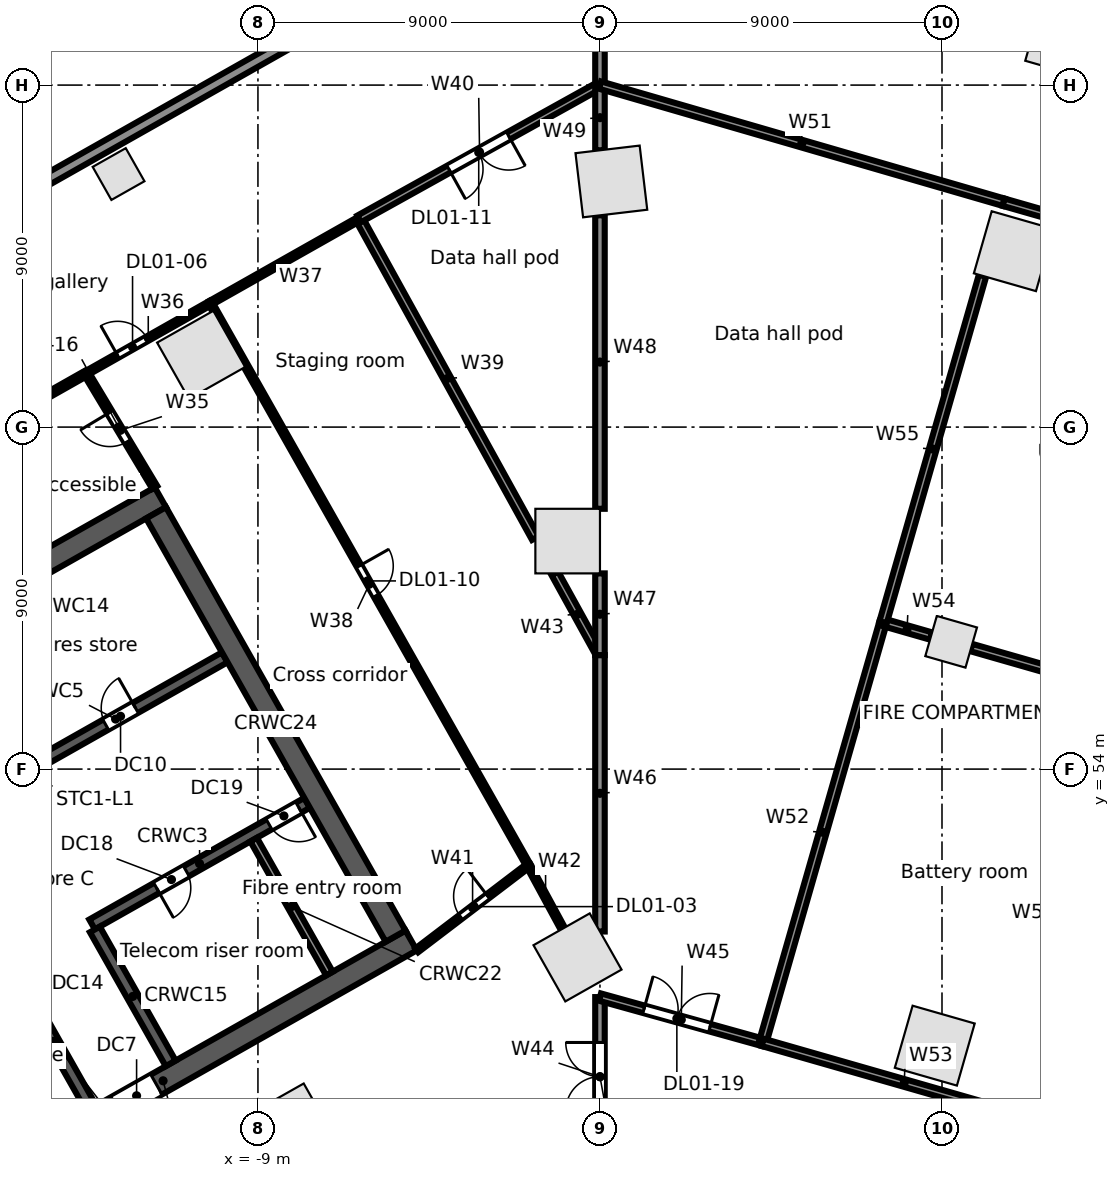
"""IFC4 building model, lengths in metres.
Left out: names, types, materials, properties, quantities, classifications, styles, units other than length and angle.
Written with IfcOpenShell. Run it as: python <this file> out.ifc"""

import sys

from ifc_helpers import new_model, si_unit, direction, frame, frame_2d, origin, origin_2d, place, context, subcontext, project, spatial, rectangle, extrude, element, fill, save


model = new_model("IFC4")
c1 = context("Model", 3, precision=1e-05, world=origin(), true_north=direction((0.0, 1.0)))
c2 = subcontext(c1, "Body", "Model", "MODEL_VIEW")
j1 = project(units=[si_unit("LENGTHUNIT", "METRE"), si_unit("PLANEANGLEUNIT", "RADIAN")], contexts=[c1])
p1 = place(None, origin())
s1 = spatial("IfcSite", under=j1, at=p1, CompositionType="ELEMENT")
p2 = place(p1, origin())
s2 = spatial("IfcBuilding", under=s1, at=p2, CompositionType="ELEMENT")
p3 = place(p2, frame((0.0, 0.0, 6.5)))
s3 = spatial("IfcBuildingStorey", under=s2, at=p3, CompositionType="ELEMENT", Elevation=6.5)
for number, where, z_axis, x_axis in (
    (1, (10.89, 67.629, 0.0), (0.0, 0.0, 1.0), (-0.961, 0.276, 0.0)),
    (2, (0.3, 69.464, 0.0), (0.0, 0.0, 1.0), (-0.993, -0.118, 0.0)),
    (3, (-10.495, 64.902, 0.0), (0.0, 0.0, 1.0), (-0.87, -0.492, 0.0)),
    (4, (-8.117, 44.568, 0.0), (0.0, 0.0, 1.0), (0.87, 0.492, 0.0)),
    (5, (-0.591, 49.044, 0.0), (0.0, 0.0, 1.0), (0.87, 0.492, 0.0)),
    (6, (8.81, 46.722, 0.0), (0.0, 0.0, 1.0), (0.961, -0.276, 0.0)),
    (7, (-0.85, 60.0, 0.0), (0.0, 0.0, 1.0), (0.0, 1.0, 0.0)),
):
    element("IfcColumn", number, at=place(p3, frame(where, z_axis=z_axis, x_axis=x_axis)), inside=s3, PredefinedType="COLUMN", context=c2, shape_type="SweptSolid", body=[
        extrude(rectangle(XDim=1.7, YDim=1.7, at=origin_2d()), origin(), (0.0, 0.0, 1.0), 5.0),
    ])
for number, where, z_axis, x_axis in (
    (8, (11.809, 72.983, 0.0), (0.0, 0.0, 1.0), (-0.961, 0.276, 0.0)),
    (9, (-12.667, 69.659, 0.0), (0.0, 0.0, 1.0), (-0.87, -0.492, 0.0)),
):
    element("IfcColumn", number, at=place(p3, frame(where, z_axis=z_axis, x_axis=x_axis)), inside=s3, PredefinedType="COLUMN", context=c2, shape_type="SweptSolid", body=[
        extrude(rectangle(XDim=1.0, YDim=1.0, at=origin_2d()), origin(), (0.0, 0.0, 1.0), 5.0),
    ])
p4 = place(p3, frame((9.241, 57.35, 0.0), z_axis=(0.0, 0.0, 1.0), x_axis=(0.961261695938, -0.275637355817, 0.0)))
e10 = element("IfcColumn", 10, at=p4, inside=s3, PredefinedType="COLUMN", context=c2, shape_type="SweptSolid", body=[
    extrude(rectangle(XDim=1.1, YDim=1.1, at=origin_2d()), origin(), (0.0, 0.0, 1.0), 5.0),
])
p5 = place(p3, frame((-63.707, 41.701, 0.0), z_axis=(0.0, 0.0, 1.0), x_axis=(0.870355510268, 0.492423888277, 0.0)))
e11 = element("IfcWall", 11, at=p5, inside=s3, PredefinedType="STANDARD", context=c2, shape_type="SweptSolid", body=[
    extrude(rectangle(XDim=67.903, YDim=0.3, at=frame_2d((33.952, 0.0))), origin(), (0.0, 0.0, 1.0), 4.65),
])
p6 = place(p3, frame((-18.024, 42.104, 0.0), z_axis=(0.0, 0.0, 1.0), x_axis=(0.870360574057, 0.492414937962, 0.0)))
e12 = element("IfcWall", 12, at=p6, inside=s3, PredefinedType="SOLIDWALL", context=c2, shape_type="SweptSolid", body=[
    extrude(rectangle(XDim=15.0, YDim=0.6, at=frame_2d((7.5, 0.0))), origin(), (0.0, 0.0, 1.0), 4.65),
])
p7 = place(p6, frame((6.1, 0.0, 0.0)))
e13 = element("IfcOpeningElement", 13, at=p7, cuts=e12, PredefinedType="OPENING", context=c2, shape_type="SweptSolid", body=[
    extrude(rectangle(XDim=1.2, YDim=2.1, at=frame_2d((0.6, 1.05))), frame((0.0, 0.31, 0.0), z_axis=(0.0, -1.0, 0.0), x_axis=(1.0, 0.0, 0.0)), (0.0, 0.0, 1.0), 0.62),
])
p8 = place(p3, frame((-13.365, 49.911, 0.0), z_axis=(0.0, 0.0, 1.0), x_axis=(0.870340995471, 0.49244954219, 0.0)))
e14 = element("IfcWall", 14, at=p8, inside=s3, PredefinedType="SOLIDWALL", context=c2, shape_type="SweptSolid", body=[
    extrude(rectangle(XDim=6.5, YDim=0.3, at=frame_2d((3.25, 0.0))), origin(), (0.0, 0.0, 1.0), 4.65),
])
p9 = place(p8, frame((1.95, 0.0, 0.0)))
e15 = element("IfcOpeningElement", 15, at=p9, cuts=e14, PredefinedType="OPENING", context=c2, shape_type="SweptSolid", body=[
    extrude(rectangle(XDim=0.9, YDim=2.1, at=frame_2d((0.45, 1.05))), frame((0.0, 0.16, 0.0), z_axis=(0.0, -1.0, 0.0), x_axis=(1.0, 0.0, 0.0)), (0.0, 0.0, 1.0), 0.32),
])
p10 = place(p8, frame((5.35, 0.0, 0.0)))
e16 = element("IfcOpeningElement", 16, at=p10, cuts=e14, PredefinedType="OPENING", context=c2, shape_type="SweptSolid", body=[
    extrude(rectangle(XDim=0.9, YDim=2.1, at=frame_2d((0.45, 1.05))), frame((0.0, 0.16, 0.0), z_axis=(0.0, -1.0, 0.0), x_axis=(1.0, 0.0, 0.0)), (0.0, 0.0, 1.0), 0.32),
])
p11 = place(p3, frame((-15.618, 53.691, 0.0), z_axis=(0.0, 0.0, 1.0), x_axis=(0.870356769198, 0.492421663121, 0.0)))
e17 = element("IfcWall", 17, at=p11, inside=s3, PredefinedType="SOLIDWALL", context=c2, shape_type="SweptSolid", body=[
    extrude(rectangle(XDim=6.6, YDim=0.3, at=frame_2d((3.3, 0.0))), origin(), (0.0, 0.0, 1.0), 4.65),
])
p12 = place(p11, frame((3.0, 0.0, 0.0)))
e18 = element("IfcOpeningElement", 18, at=p12, cuts=e17, PredefinedType="OPENING", context=c2, shape_type="SweptSolid", body=[
    extrude(rectangle(XDim=0.9, YDim=2.1, at=frame_2d((0.45, 1.05))), frame((0.0, 0.16, 0.0), z_axis=(0.0, -1.0, 0.0), x_axis=(1.0, 0.0, 0.0)), (0.0, 0.0, 1.0), 0.32),
])
p13 = place(p3, frame((-24.623, 53.767, 0.0), z_axis=(0.0, 0.0, 1.0), x_axis=(0.870356627484, 0.492421913601, 0.0)))
e19 = element("IfcWall", 19, at=p13, inside=s3, PredefinedType="SOLIDWALL", context=c2, shape_type="SweptSolid", body=[
    extrude(rectangle(XDim=15.0, YDim=0.6, at=frame_2d((7.5, 0.0))), origin(), (0.0, 0.0, 1.0), 4.65),
])
for number, where, z_axis, x_axis in (
    (20, (-15.379, 48.599, 0.0), (0.0, 0.0, 1.0), (0.492, -0.87, 0.0)),
    (21, (-13.291, 49.781, 0.0), (0.0, 0.0, 1.0), (0.492, -0.87, 0.0)),
):
    element("IfcWall", number, at=place(p3, frame(where, z_axis=z_axis, x_axis=x_axis)), inside=s3, PredefinedType="SOLIDWALL", context=c2, shape_type="SweptSolid", body=[
        extrude(rectangle(XDim=4.05, YDim=0.3, at=frame_2d((2.025, 0.0))), origin(), (0.0, 0.0, 1.0), 4.65),
    ])
p14 = place(p3, frame((-9.113, 52.144, 0.0), z_axis=(0.0, 0.0, 1.0), x_axis=(0.492394910396, -0.870371904542, 0.0)))
e22 = element("IfcWall", 22, at=p14, inside=s3, PredefinedType="PARTITIONING", context=c2, shape_type="SweptSolid", body=[
    extrude(rectangle(XDim=4.05, YDim=0.2, at=frame_2d((2.025, 0.0))), origin(), (0.0, 0.0, 1.0), 4.65),
])
p15 = place(p3, frame((-11.681, 60.744, 0.0), z_axis=(0.0, 0.0, 1.0), x_axis=(0.492426772896, -0.870353878221, 0.0)))
e23 = element("IfcWall", 23, at=p15, inside=s3, PredefinedType="SOLIDWALL", context=c2, shape_type="SweptSolid", body=[
    extrude(rectangle(XDim=12.8, YDim=0.6, at=frame_2d((6.4, 0.0))), origin(), (0.0, 0.0, 1.0), 4.65),
])
p16 = place(p3, frame((-16.346, 62.816, 0.0), z_axis=(0.0, 0.0, 1.0), x_axis=(0.870334637055, 0.492460779699, 0.0)))
e24 = element("IfcWall", 24, at=p16, inside=s3, PredefinedType="PARTITIONING", context=c2, shape_type="SweptSolid", body=[
    extrude(rectangle(XDim=3.249, YDim=0.15, at=frame_2d((1.625, 0.0))), origin(), (0.0, 0.0, 1.0), 4.65),
])
p17 = place(p3, frame((-13.518, 64.416, 0.0), z_axis=(0.0, 0.0, 1.0), x_axis=(0.514875058642, -0.857265229663, 0.0)))
e25 = element("IfcWall", 25, at=p17, inside=s3, PredefinedType="PARTITIONING", context=c2, shape_type="SweptSolid", body=[
    extrude(rectangle(XDim=3.502, YDim=0.15, at=frame_2d((1.751, 0.0))), origin(), (0.0, 0.0, 1.0), 3.93),
])
p18 = place(p17, frame((1.2, 0.0, 0.0)))
e26 = element("IfcOpeningElement", 26, at=p18, cuts=e25, PredefinedType="OPENING", context=c2, shape_type="SweptSolid", body=[
    extrude(rectangle(XDim=0.9, YDim=2.1, at=frame_2d((0.45, 1.05))), frame((0.0, 0.085, 0.0), z_axis=(0.0, -1.0, 0.0), x_axis=(1.0, 0.0, 0.0)), (0.0, 0.0, 1.0), 0.17),
])
p19 = place(p3, frame((-13.518, 64.416, 0.0), z_axis=(0.0, 0.0, 1.0), x_axis=(0.870338454914, 0.492454032268, 0.0)))
e27 = element("IfcWall", 27, at=p19, inside=s3, PredefinedType="PARTITIONING", context=c2, shape_type="SweptSolid", body=[
    extrude(rectangle(XDim=3.75, YDim=0.125, at=frame_2d((1.875, 0.0))), origin(), (0.0, 0.0, 1.0), 3.712),
])
p20 = place(p19, frame((0.95, 0.0, 0.0)))
e28 = element("IfcOpeningElement", 28, at=p20, cuts=e27, PredefinedType="OPENING", context=c2, shape_type="SweptSolid", body=[
    extrude(rectangle(XDim=0.9, YDim=2.1, at=frame_2d((0.45, 1.05))), frame((0.0, 0.073, 0.0), z_axis=(0.0, -1.0, 0.0), x_axis=(1.0, 0.0, 0.0)), (0.0, 0.0, 1.0), 0.145),
])
p21 = place(p3, frame((-10.254, 66.263, 0.0), z_axis=(0.0, 0.0, 1.0), x_axis=(0.870454697906, 0.492248533664, 0.0)))
e29 = element("IfcWall", 29, at=p21, inside=s3, PredefinedType="PARTITIONING", context=c2, shape_type="SweptSolid", body=[
    extrude(rectangle(XDim=4.5, YDim=0.125, at=frame_2d((2.25, 0.0))), origin(), (0.0, 0.0, 1.0), 4.65),
])
p22 = place(p3, frame((-10.254, 66.263, 0.0), z_axis=(0.0, 0.0, 1.0), x_axis=(0.492411664329, -0.870362426138, 0.0)))
e30 = element("IfcWall", 30, at=p22, inside=s3, PredefinedType="PARTITIONING", context=c2, shape_type="SweptSolid", body=[
    extrude(rectangle(XDim=17.0, YDim=0.125, at=frame_2d((8.5, 0.0))), origin(), (0.0, 0.0, 1.0), 3.712),
])
p23 = place(p22, frame((7.95, 0.0, 0.0)))
e31 = element("IfcOpeningElement", 31, at=p23, cuts=e30, PredefinedType="OPENING", context=c2, shape_type="SweptSolid", body=[
    extrude(rectangle(XDim=0.9, YDim=2.1, at=frame_2d((0.45, 1.05))), frame((0.0, 0.073, 0.0), z_axis=(0.0, -1.0, 0.0), x_axis=(1.0, 0.0, 0.0)), (0.0, 0.0, 1.0), 0.145),
])
p24 = place(p3, frame((-6.337, 68.478, 0.0), z_axis=(0.0, 0.0, 1.0), x_axis=(0.483322867171, -0.875442177456, 0.0)))
e32 = element("IfcWall", 32, at=p24, inside=s3, PredefinedType="PARTITIONING", context=c2, shape_type="SweptSolid", body=[
    extrude(rectangle(XDim=9.594, YDim=0.2, at=frame_2d((4.797, 0.0))), origin(), (0.0, 0.0, 1.0), 3.712),
])
p25 = place(p3, frame((-6.337, 68.478, 0.0), z_axis=(0.0, 0.0, 1.0), x_axis=(0.87407148623, 0.485797320864, 0.0)))
e33 = element("IfcWall", 33, at=p25, inside=s3, PredefinedType="PARTITIONING", context=c2, shape_type="SweptSolid", body=[
    extrude(rectangle(XDim=7.25, YDim=0.2, at=frame_2d((3.625, 0.0))), origin(), (0.0, 0.0, 1.0), 3.93),
])
p26 = place(p25, frame((2.7, 0.0, 0.0)))
e34 = element("IfcOpeningElement", 34, at=p26, cuts=e33, PredefinedType="OPENING", context=c2, shape_type="SweptSolid", body=[
    extrude(rectangle(XDim=1.8, YDim=2.1, at=frame_2d((0.9, 1.05))), frame((0.0, 0.11, 0.0), z_axis=(0.0, -1.0, 0.0), x_axis=(1.0, 0.0, 0.0)), (0.0, 0.0, 1.0), 0.22),
])
p27 = place(p3, frame((-4.821, 49.23, 0.0), z_axis=(0.0, 0.0, 1.0), x_axis=(0.795615322848, 0.605802160816, 0.0)))
e35 = element("IfcWall", 35, at=p27, inside=s3, PredefinedType="PARTITIONING", context=c2, shape_type="SweptSolid", body=[
    extrude(rectangle(XDim=3.693, YDim=0.125, at=frame_2d((1.846, 0.0))), origin(), (0.0, 0.0, 1.0), 4.65),
])
p28 = place(p27, frame((1.45, 0.0, 0.0)))
e36 = element("IfcOpeningElement", 36, at=p28, cuts=e35, PredefinedType="OPENING", context=c2, shape_type="SweptSolid", body=[
    extrude(rectangle(XDim=0.9, YDim=2.1, at=frame_2d((0.45, 1.05))), frame((0.0, 0.073, 0.0), z_axis=(0.0, -1.0, 0.0), x_axis=(1.0, 0.0, 0.0)), (0.0, 0.0, 1.0), 0.145),
])
p29 = place(p3, frame((-1.883, 51.467, 0.0), z_axis=(0.0, 0.0, 1.0), x_axis=(0.477162952876, -0.878814836244, 0.0)))
e37 = element("IfcWall", 37, at=p29, inside=s3, PredefinedType="PARTITIONING", context=c2, shape_type="SweptSolid", body=[
    extrude(rectangle(XDim=1.895, YDim=0.125, at=frame_2d((0.947, 0.0))), origin(), (0.0, 0.0, 1.0), 4.65),
])
p30 = place(p3, frame((-1.187, 59.15, 0.0), z_axis=(0.0, 0.0, 1.0), x_axis=(0.483345381597, -0.875429747089, 0.0)))
e38 = element("IfcWall", 38, at=p30, inside=s3, PredefinedType="PARTITIONING", context=c2, shape_type="SweptSolid", body=[
    extrude(rectangle(XDim=2.456, YDim=0.2, at=frame_2d((1.228, 0.0))), origin(), (0.0, 0.0, 1.0), 4.65),
])
p31 = place(p3, frame((0.0, 43.806, 0.0), z_axis=(0.0, 0.0, 1.0), x_axis=(0.0, 1.0, 0.0)))
e39 = element("IfcWall", 39, at=p31, inside=s3, PredefinedType="PARTITIONING", context=c2, shape_type="SweptSolid", body=[
    extrude(rectangle(XDim=4.194, YDim=0.25, at=frame_2d((2.097, 0.0))), origin(), (0.0, 0.0, 1.0), 3.712),
])
p32 = place(p31, frame((1.2, 0.0, 0.0)))
e40 = element("IfcOpeningElement", 40, at=p32, cuts=e39, PredefinedType="OPENING", context=c2, shape_type="SweptSolid", body=[
    extrude(rectangle(XDim=1.8, YDim=2.1, at=frame_2d((0.9, 1.05))), frame((0.0, 0.135, 0.0), z_axis=(0.0, -1.0, 0.0), x_axis=(1.0, 0.0, 0.0)), (0.0, 0.0, 1.0), 0.27),
])
p33 = place(p3, frame((0.0, 48.0, 0.0), z_axis=(0.0, 0.0, 1.0), x_axis=(0.963400508162, -0.268066150181, 0.0)))
e41 = element("IfcWall", 41, at=p33, inside=s3, PredefinedType="PARTITIONING", context=c2, shape_type="SweptSolid", body=[
    extrude(rectangle(XDim=4.443, YDim=0.2, at=frame_2d((2.221, 0.0))), origin(), (0.0, 0.0, 1.0), 4.65),
])
p34 = place(p33, frame((1.2, 0.0, 0.0)))
e42 = element("IfcOpeningElement", 42, at=p34, cuts=e41, PredefinedType="OPENING", context=c2, shape_type="SweptSolid", body=[
    extrude(rectangle(XDim=1.8, YDim=2.1, at=frame_2d((0.9, 1.05))), frame((0.0, 0.11, 0.0), z_axis=(0.0, -1.0, 0.0), x_axis=(1.0, 0.0, 0.0)), (0.0, 0.0, 1.0), 0.22),
])
p35 = place(p3, frame((0.0, 49.726, 0.0), z_axis=(0.0, 0.0, 1.0), x_axis=(0.0, 1.0, 0.0)))
e43 = element("IfcWall", 43, at=p35, inside=s3, PredefinedType="PARTITIONING", context=c2, shape_type="SweptSolid", body=[
    extrude(rectangle(XDim=7.274, YDim=0.25, at=frame_2d((3.637, 0.0))), origin(), (0.0, 0.0, 1.0), 4.65),
])
p36 = place(p3, frame((0.0, 57.0, 0.0), z_axis=(0.0, 0.0, 1.0), x_axis=(0.0, 1.0, 0.0)))
e44 = element("IfcWall", 44, at=p36, inside=s3, PredefinedType="PARTITIONING", context=c2, shape_type="SweptSolid", body=[
    extrude(rectangle(XDim=2.15, YDim=0.25, at=frame_2d((1.075, 0.0))), origin(), (0.0, 0.0, 1.0), 4.65),
])
p37 = place(p3, frame((0.0, 60.85, 0.0), z_axis=(0.0, 0.0, 1.0), x_axis=(0.0, 1.0, 0.0)))
e45 = element("IfcWall", 45, at=p37, inside=s3, PredefinedType="PARTITIONING", context=c2, shape_type="SweptSolid", body=[
    extrude(rectangle(XDim=7.723, YDim=0.25, at=frame_2d((3.861, 0.0))), origin(), (0.0, 0.0, 1.0), 3.93),
])
p38 = place(p3, frame((0.0, 70.285, 0.0), z_axis=(0.0, 0.0, 1.0), x_axis=(0.0, 1.0, 0.0)))
e46 = element("IfcWall", 46, at=p38, inside=s3, PredefinedType="PARTITIONING", context=c2, shape_type="SweptSolid", body=[
    extrude(rectangle(XDim=1.715, YDim=0.25, at=frame_2d((0.857, 0.0))), origin(), (0.0, 0.0, 1.0), 4.65),
])
p39 = place(p3, frame((0.0, 72.0, 0.0), z_axis=(0.0, 0.0, 1.0), x_axis=(0.0, 1.0, 0.0)))
e47 = element("IfcWall", 47, at=p39, inside=s3, PredefinedType="PARTITIONING", context=c2, shape_type="SweptSolid", body=[
    extrude(rectangle(XDim=3.521, YDim=0.25, at=frame_2d((1.76, 0.0))), origin(), (0.0, 0.0, 1.0), 4.024),
])
p40 = place(p3, frame((0.0, 72.0, 0.0), z_axis=(0.0, 0.0, 1.0), x_axis=(0.960375968852, -0.278707729443, 0.0)))
e48 = element("IfcWall", 48, at=p40, inside=s3, PredefinedType="PARTITIONING", context=c2, shape_type="SweptSolid", body=[
    extrude(rectangle(XDim=11.058, YDim=0.2, at=frame_2d((5.529, 0.0))), origin(), (0.0, 0.0, 1.0), 3.712),
])
p41 = place(p3, frame((4.28, 46.809, 0.0), z_axis=(0.0, 0.0, 1.0), x_axis=(0.275635044812, 0.961262358605, 0.0)))
e49 = element("IfcWall", 49, at=p41, inside=s3, PredefinedType="PARTITIONING", context=c2, shape_type="SweptSolid", body=[
    extrude(rectangle(XDim=11.5, YDim=0.2, at=frame_2d((5.75, 0.0))), origin(), (0.0, 0.0, 1.0), 3.712),
])
p42 = place(p3, frame((4.28, 46.809, 0.0), z_axis=(0.0, 0.0, 1.0), x_axis=(0.961270337968, -0.275607215693, 0.0)))
e50 = element("IfcWall", 50, at=p42, inside=s3, PredefinedType="PARTITIONING", context=c2, shape_type="SweptSolid", body=[
    extrude(rectangle(XDim=7.75, YDim=0.2, at=frame_2d((3.875, 0.0))), origin(), (0.0, 0.0, 1.0), 4.03),
])
p43 = place(p3, frame((7.45, 57.864, 0.0), z_axis=(0.0, 0.0, 1.0), x_axis=(0.961221622993, -0.275777068465, 0.0)))
e51 = element("IfcWall", 51, at=p43, inside=s3, PredefinedType="PARTITIONING", context=c2, shape_type="SweptSolid", body=[
    extrude(rectangle(XDim=1.313, YDim=0.2, at=frame_2d((0.656, 0.0))), origin(), (0.0, 0.0, 1.0), 3.712),
])
p44 = place(p3, frame((7.45, 57.864, 0.0), z_axis=(0.0, 0.0, 1.0), x_axis=(0.275710305557, 0.961240774941, 0.0)))
e52 = element("IfcWall", 52, at=p44, inside=s3, PredefinedType="PARTITIONING", context=c2, shape_type="SweptSolid", body=[
    extrude(rectangle(XDim=9.485, YDim=0.2, at=frame_2d((4.742, 0.0))), origin(), (0.0, 0.0, 1.0), 3.712),
])
p45 = place(p3, frame((9.77, 57.199, 0.0), z_axis=(0.0, 0.0, 1.0), x_axis=(0.961262835898, -0.275633380273, 0.0)))
e53 = element("IfcWall", 53, at=p45, inside=s3, PredefinedType="PARTITIONING", context=c2, shape_type="SweptSolid", body=[
    extrude(rectangle(XDim=5.337, YDim=0.2, at=frame_2d((2.668, 0.0))), origin(), (0.0, 0.0, 1.0), 3.712),
])
p46 = place(p3, frame((10.62, 68.918, 0.0), z_axis=(0.0, 0.0, 1.0), x_axis=(0.961260764876, -0.275640602796, 0.0)))
e54 = element("IfcWall", 54, at=p46, inside=s3, PredefinedType="PARTITIONING", context=c2, shape_type="SweptSolid", body=[
    extrude(rectangle(XDim=7.749, YDim=0.2, at=frame_2d((3.875, 0.0))), origin(), (0.0, 0.0, 1.0), 3.712),
])
p47 = place(p7, frame((1.2, 0.0, 0.0), z_axis=(0.0, 0.0, 1.0), x_axis=(-1.0, 0.0, 0.0)))
e55 = element("IfcDoor", 55, at=p47, inside=s3, OperationType="SINGLE_SWING_RIGHT", PredefinedType="DOOR", context=c2, shape_type="SweptSolid", body=[
    extrude(rectangle(XDim=1.2, YDim=2.1, at=frame_2d((0.6, 1.05))), frame((0.0, 0.025, 0.0), z_axis=(0.0, -1.0, 0.0), x_axis=(1.0, 0.0, 0.0)), (0.0, 0.0, 1.0), 0.05),
])
fill(e13, e55)
p48 = place(p12, origin())
e56 = element("IfcDoor", 56, at=p48, inside=s3, OperationType="SINGLE_SWING_RIGHT", PredefinedType="DOOR", context=c2, shape_type="SweptSolid", body=[
    extrude(rectangle(XDim=0.9, YDim=2.1, at=frame_2d((0.45, 1.05))), frame((0.0, 0.025, 0.0), z_axis=(0.0, -1.0, 0.0), x_axis=(1.0, 0.0, 0.0)), (0.0, 0.0, 1.0), 0.05),
])
fill(e18, e56)
p49 = place(p9, frame((0.9, 0.0, 0.0), z_axis=(0.0, 0.0, 1.0), x_axis=(-1.0, 0.0, 0.0)))
e57 = element("IfcDoor", 57, at=p49, inside=s3, OperationType="SINGLE_SWING_RIGHT", PredefinedType="DOOR", context=c2, shape_type="SweptSolid", body=[
    extrude(rectangle(XDim=0.9, YDim=2.1, at=frame_2d((0.45, 1.05))), frame((0.0, 0.025, 0.0), z_axis=(0.0, -1.0, 0.0), x_axis=(1.0, 0.0, 0.0)), (0.0, 0.0, 1.0), 0.05),
])
fill(e15, e57)
p50 = place(p10, frame((0.9, 0.0, 0.0), z_axis=(0.0, 0.0, 1.0), x_axis=(-1.0, 0.0, 0.0)))
e58 = element("IfcDoor", 58, at=p50, inside=s3, OperationType="SINGLE_SWING_LEFT", PredefinedType="DOOR", context=c2, shape_type="SweptSolid", body=[
    extrude(rectangle(XDim=0.9, YDim=2.1, at=frame_2d((0.45, 1.05))), frame((0.0, 0.025, 0.0), z_axis=(0.0, -1.0, 0.0), x_axis=(1.0, 0.0, 0.0)), (0.0, 0.0, 1.0), 0.05),
])
fill(e16, e58)
p51 = place(p28, origin())
e59 = element("IfcDoor", 59, at=p51, inside=s3, OperationType="SINGLE_SWING_RIGHT", PredefinedType="DOOR", context=c2, shape_type="SweptSolid", body=[
    extrude(rectangle(XDim=0.9, YDim=2.1, at=frame_2d((0.45, 1.05))), frame((0.0, 0.025, 0.0), z_axis=(0.0, -1.0, 0.0), x_axis=(1.0, 0.0, 0.0)), (0.0, 0.0, 1.0), 0.05),
])
fill(e36, e59)
p52 = place(p20, origin())
e60 = element("IfcDoor", 60, at=p52, inside=s3, OperationType="SINGLE_SWING_LEFT", PredefinedType="DOOR", context=c2, shape_type="SweptSolid", body=[
    extrude(rectangle(XDim=0.9, YDim=2.1, at=frame_2d((0.45, 1.05))), frame((0.0, 0.025, 0.0), z_axis=(0.0, -1.0, 0.0), x_axis=(1.0, 0.0, 0.0)), (0.0, 0.0, 1.0), 0.05),
])
fill(e28, e60)
p53 = place(p23, origin())
e61 = element("IfcDoor", 61, at=p53, inside=s3, OperationType="SINGLE_SWING_LEFT", PredefinedType="DOOR", context=c2, shape_type="SweptSolid", body=[
    extrude(rectangle(XDim=0.9, YDim=2.1, at=frame_2d((0.45, 1.05))), frame((0.0, 0.025, 0.0), z_axis=(0.0, -1.0, 0.0), x_axis=(1.0, 0.0, 0.0)), (0.0, 0.0, 1.0), 0.05),
])
fill(e31, e61)
p54 = place(p26, frame((1.8, 0.0, 0.0), z_axis=(0.0, 0.0, 1.0), x_axis=(-1.0, 0.0, 0.0)))
e62 = element("IfcDoor", 62, at=p54, inside=s3, OperationType="DOUBLE_DOOR_SINGLE_SWING", PredefinedType="DOOR", context=c2, shape_type="SweptSolid", body=[
    extrude(rectangle(XDim=1.8, YDim=2.1, at=frame_2d((0.9, 1.05))), frame((0.0, 0.025, 0.0), z_axis=(0.0, -1.0, 0.0), x_axis=(1.0, 0.0, 0.0)), (0.0, 0.0, 1.0), 0.05),
])
fill(e34, e62)
p55 = place(p18, frame((0.9, 0.0, 0.0), z_axis=(0.0, 0.0, 1.0), x_axis=(-1.0, 0.0, 0.0)))
e63 = element("IfcDoor", 63, at=p55, inside=s3, OperationType="SINGLE_SWING_RIGHT", PredefinedType="DOOR", context=c2, shape_type="SweptSolid", body=[
    extrude(rectangle(XDim=0.9, YDim=2.1, at=frame_2d((0.45, 1.05))), frame((0.0, 0.025, 0.0), z_axis=(0.0, -1.0, 0.0), x_axis=(1.0, 0.0, 0.0)), (0.0, 0.0, 1.0), 0.05),
])
fill(e26, e63)
p56 = place(p34, origin())
e64 = element("IfcDoor", 64, at=p56, inside=s3, OperationType="DOUBLE_DOOR_SINGLE_SWING", PredefinedType="DOOR", context=c2, shape_type="SweptSolid", body=[
    extrude(rectangle(XDim=1.8, YDim=2.1, at=frame_2d((0.9, 1.05))), frame((0.0, 0.025, 0.0), z_axis=(0.0, -1.0, 0.0), x_axis=(1.0, 0.0, 0.0)), (0.0, 0.0, 1.0), 0.05),
])
fill(e42, e64)
p57 = place(p32, origin())
e65 = element("IfcDoor", 65, at=p57, inside=s3, OperationType="DOUBLE_DOOR_SINGLE_SWING", PredefinedType="DOOR", context=c2, shape_type="SweptSolid", body=[
    extrude(rectangle(XDim=1.8, YDim=2.1, at=frame_2d((0.9, 1.05))), frame((0.0, 0.025, 0.0), z_axis=(0.0, -1.0, 0.0), x_axis=(1.0, 0.0, 0.0)), (0.0, 0.0, 1.0), 0.05),
])
fill(e40, e65)
save(model, sys.argv[1])
